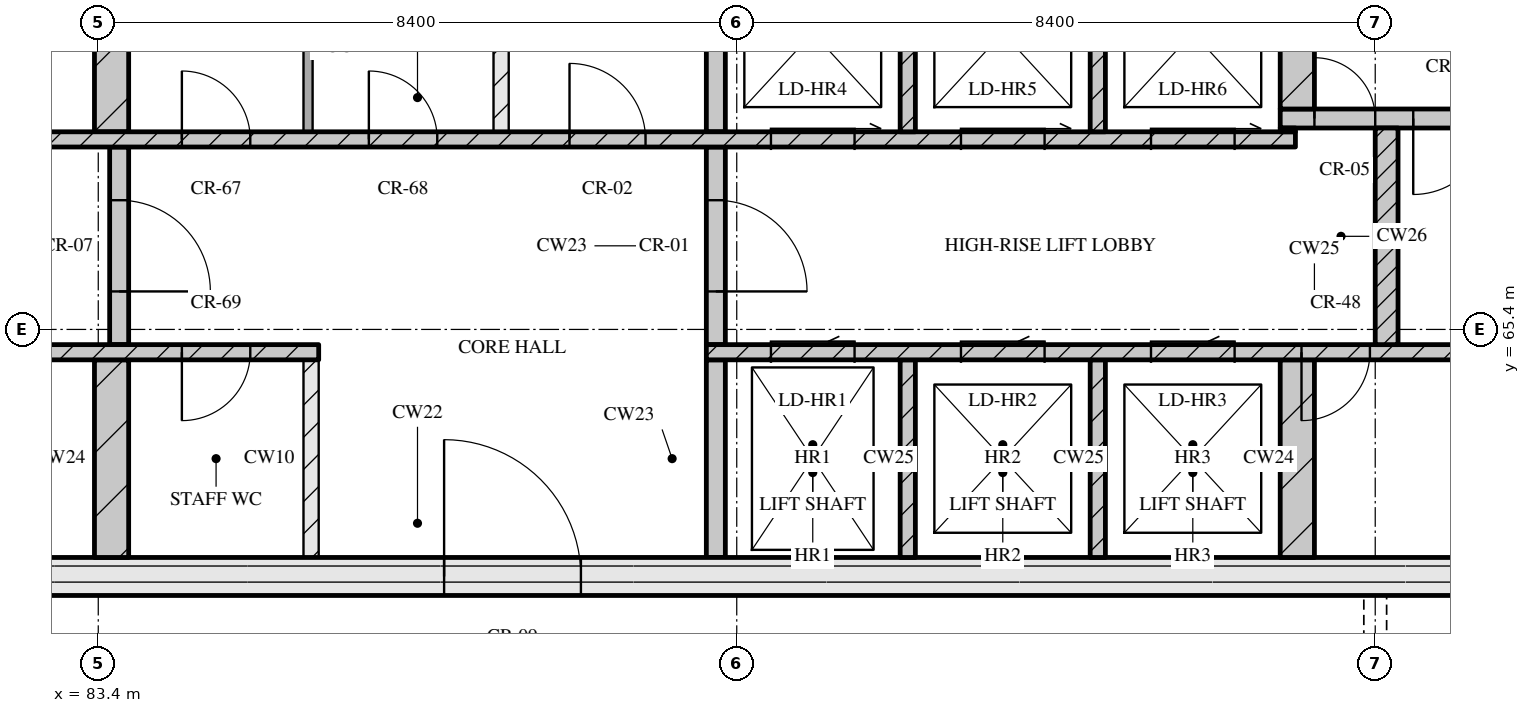
"""IFC4 building model, lengths in metres.
Left out: names, types, materials, properties, quantities, classifications, styles, units other than length and angle.
Written with IfcOpenShell. Run it as: python <this file> out.ifc"""

import sys

from ifc_helpers import new_model, si_unit, direction, frame, frame_2d, origin, place, context, subcontext, project, spatial, rectangle, extrude, element, fill, save


model = new_model("IFC4")
c1 = context("Model", 3, precision=1e-05, world=origin(), true_north=direction((0.0, 1.0)))
c2 = subcontext(c1, "Body", "Model", "MODEL_VIEW")
j1 = project(units=[si_unit("LENGTHUNIT", "METRE"), si_unit("PLANEANGLEUNIT", "RADIAN")], contexts=[c1])
p1 = place(None, origin())
s1 = spatial("IfcSite", under=j1, at=p1, CompositionType="ELEMENT")
p2 = place(p1, origin())
s2 = spatial("IfcBuilding", under=s1, at=p2, CompositionType="ELEMENT")
p3 = place(p2, frame((0.0, 0.0, 274.35)))
s3 = spatial("IfcBuildingStorey", under=s2, at=p3, CompositionType="ELEMENT", Elevation=274.35)
p4 = place(p3, frame((67.3, 62.15, 0.0), z_axis=(0.0, 0.0, 1.0), x_axis=(1.0, 0.0, 0.0)))
e1 = element("IfcWall", 1, at=p4, inside=s3, PredefinedType="SOLIDWALL", context=c2, shape_type="SweptSolid", body=[
    extrude(rectangle(XDim=40.6, YDim=0.5, at=frame_2d((20.3, 0.0))), origin(), (0.0, 0.0, 1.0), 3.32),
])
p5 = place(p4, frame((20.65, 0.0, 0.0)))
e2 = element("IfcOpeningElement", 2, at=p5, cuts=e1, PredefinedType="OPENING", context=c2, shape_type="SweptSolid", body=[
    extrude(rectangle(XDim=1.8, YDim=2.1, at=frame_2d((0.9, 1.05))), frame((0.0, 0.26, 0.0), z_axis=(0.0, -1.0, 0.0), x_axis=(1.0, 0.0, 0.0)), (0.0, 0.0, 1.0), 0.52),
])
p6 = place(p3, frame((83.575, 62.4, 0.0), z_axis=(0.0, 0.0, 1.0), x_axis=(0.0, 1.0, 0.0)))
e3 = element("IfcWall", 3, at=p6, inside=s3, PredefinedType="SOLIDWALL", context=c2, shape_type="SweptSolid", body=[
    extrude(rectangle(XDim=2.6, YDim=0.45, at=frame_2d((1.3, 0.0))), origin(), (0.0, 0.0, 1.0), 3.32),
])
p7 = place(p3, frame((86.2, 62.4, 0.0), z_axis=(0.0, 0.0, 1.0), x_axis=(0.0, 1.0, 0.0)))
e4 = element("IfcWall", 4, at=p7, inside=s3, PredefinedType="PARTITIONING", context=c2, shape_type="SweptSolid", body=[
    extrude(rectangle(XDim=2.6, YDim=0.2, at=frame_2d((1.3, 0.0))), origin(), (0.0, 0.0, 1.0), 3.32),
])
p8 = place(p3, frame((91.525, 62.4, 0.0), z_axis=(0.0, 0.0, 1.0), x_axis=(0.0, 1.0, 0.0)))
e5 = element("IfcWall", 5, at=p8, inside=s3, PredefinedType="SOLIDWALL", context=c2, shape_type="SweptSolid", body=[
    extrude(rectangle(XDim=2.6, YDim=0.25, at=frame_2d((1.3, 0.0))), origin(), (0.0, 0.0, 1.0), 3.32),
])
for number, where, z_axis, x_axis in (
    (6, (94.05, 62.4, 0.0), (0.0, 0.0, 1.0), (0.0, 1.0, 0.0)),
    (7, (96.55, 62.4, 0.0), (0.0, 0.0, 1.0), (0.0, 1.0, 0.0)),
):
    element("IfcWall", number, at=place(p3, frame(where, z_axis=z_axis, x_axis=x_axis)), inside=s3, PredefinedType="SOLIDWALL", context=c2, shape_type="SweptSolid", body=[
        extrude(rectangle(XDim=2.6, YDim=0.2, at=frame_2d((1.3, 0.0))), origin(), (0.0, 0.0, 1.0), 3.32),
    ])
p9 = place(p3, frame((99.175, 62.4, 0.0), z_axis=(0.0, 0.0, 1.0), x_axis=(0.0, 1.0, 0.0)))
e8 = element("IfcWall", 8, at=p9, inside=s3, PredefinedType="SOLIDWALL", context=c2, shape_type="SweptSolid", body=[
    extrude(rectangle(XDim=2.6, YDim=0.45, at=frame_2d((1.3, 0.0))), origin(), (0.0, 0.0, 1.0), 3.32),
])
p10 = place(p3, frame((67.8, 65.1, 0.0), z_axis=(0.0, 0.0, 1.0), x_axis=(1.0, 0.0, 0.0)))
e9 = element("IfcWall", 9, at=p10, inside=s3, PredefinedType="SOLIDWALL", context=c2, shape_type="SweptSolid", body=[
    extrude(rectangle(XDim=18.5, YDim=0.2, at=frame_2d((9.25, 0.0))), origin(), (0.0, 0.0, 1.0), 3.32),
])
p11 = place(p10, frame((7.27, 0.0, 0.0)))
e10 = element("IfcOpeningElement", 10, at=p11, cuts=e9, PredefinedType="OPENING", context=c2, shape_type="SweptSolid", body=[
    extrude(rectangle(XDim=0.9, YDim=2.1, at=frame_2d((0.45, 1.05))), frame((0.0, 0.11, 0.0), z_axis=(0.0, -1.0, 0.0), x_axis=(1.0, 0.0, 0.0)), (0.0, 0.0, 1.0), 0.22),
])
p12 = place(p10, frame((9.05, 0.0, 0.0)))
e11 = element("IfcOpeningElement", 11, at=p12, cuts=e9, PredefinedType="OPENING", context=c2, shape_type="SweptSolid", body=[
    extrude(rectangle(XDim=0.9, YDim=2.1, at=frame_2d((0.45, 1.05))), frame((0.0, 0.11, 0.0), z_axis=(0.0, -1.0, 0.0), x_axis=(1.0, 0.0, 0.0)), (0.0, 0.0, 1.0), 0.22),
])
p13 = place(p10, frame((12.76, 0.0, 0.0)))
e12 = element("IfcOpeningElement", 12, at=p13, cuts=e9, PredefinedType="OPENING", context=c2, shape_type="SweptSolid", body=[
    extrude(rectangle(XDim=0.9, YDim=2.1, at=frame_2d((0.45, 1.05))), frame((0.0, 0.11, 0.0), z_axis=(0.0, -1.0, 0.0), x_axis=(1.0, 0.0, 0.0)), (0.0, 0.0, 1.0), 0.22),
])
p14 = place(p10, frame((16.7, 0.0, 0.0)))
e13 = element("IfcOpeningElement", 13, at=p14, cuts=e9, PredefinedType="OPENING", context=c2, shape_type="SweptSolid", body=[
    extrude(rectangle(XDim=0.9, YDim=2.1, at=frame_2d((0.45, 1.05))), frame((0.0, 0.11, 0.0), z_axis=(0.0, -1.0, 0.0), x_axis=(1.0, 0.0, 0.0)), (0.0, 0.0, 1.0), 0.22),
])
p15 = place(p3, frame((91.4, 65.1, 0.0), z_axis=(0.0, 0.0, 1.0), x_axis=(1.0, 0.0, 0.0)))
e14 = element("IfcWall", 14, at=p15, inside=s3, PredefinedType="SOLIDWALL", context=c2, shape_type="SweptSolid", body=[
    extrude(rectangle(XDim=16.0, YDim=0.2, at=frame_2d((8.0, 0.0))), origin(), (0.0, 0.0, 1.0), 3.32),
])
p16 = place(p15, frame((0.85, 0.0, 0.0)))
e15 = element("IfcOpeningElement", 15, at=p16, cuts=e14, PredefinedType="OPENING", context=c2, shape_type="SweptSolid", body=[
    extrude(rectangle(XDim=1.1, YDim=2.1, at=frame_2d((0.55, 1.05))), frame((0.0, 0.11, 0.0), z_axis=(0.0, -1.0, 0.0), x_axis=(1.0, 0.0, 0.0)), (0.0, 0.0, 1.0), 0.22),
])
p17 = place(p15, frame((3.35, 0.0, 0.0)))
e16 = element("IfcOpeningElement", 16, at=p17, cuts=e14, PredefinedType="OPENING", context=c2, shape_type="SweptSolid", body=[
    extrude(rectangle(XDim=1.1, YDim=2.1, at=frame_2d((0.55, 1.05))), frame((0.0, 0.11, 0.0), z_axis=(0.0, -1.0, 0.0), x_axis=(1.0, 0.0, 0.0)), (0.0, 0.0, 1.0), 0.22),
])
p18 = place(p15, frame((5.85, 0.0, 0.0)))
e17 = element("IfcOpeningElement", 17, at=p18, cuts=e14, PredefinedType="OPENING", context=c2, shape_type="SweptSolid", body=[
    extrude(rectangle(XDim=1.1, YDim=2.1, at=frame_2d((0.55, 1.05))), frame((0.0, 0.11, 0.0), z_axis=(0.0, -1.0, 0.0), x_axis=(1.0, 0.0, 0.0)), (0.0, 0.0, 1.0), 0.22),
])
p19 = place(p15, frame((7.83, 0.0, 0.0)))
e18 = element("IfcOpeningElement", 18, at=p19, cuts=e14, PredefinedType="OPENING", context=c2, shape_type="SweptSolid", body=[
    extrude(rectangle(XDim=0.9, YDim=2.1, at=frame_2d((0.45, 1.05))), frame((0.0, 0.11, 0.0), z_axis=(0.0, -1.0, 0.0), x_axis=(1.0, 0.0, 0.0)), (0.0, 0.0, 1.0), 0.22),
])
p20 = place(p3, frame((83.675, 65.2, 0.0), z_axis=(0.0, 0.0, 1.0), x_axis=(0.0, 1.0, 0.0)))
e19 = element("IfcWall", 19, at=p20, inside=s3, PredefinedType="SOLIDWALL", context=c2, shape_type="SweptSolid", body=[
    extrude(rectangle(XDim=2.6, YDim=0.25, at=frame_2d((1.3, 0.0))), origin(), (0.0, 0.0, 1.0), 3.32),
])
p21 = place(p20, frame((0.7, 0.0, 0.0)))
e20 = element("IfcOpeningElement", 20, at=p21, cuts=e19, PredefinedType="OPENING", context=c2, shape_type="SweptSolid", body=[
    extrude(rectangle(XDim=1.2, YDim=2.1, at=frame_2d((0.6, 1.05))), frame((0.0, 0.135, 0.0), z_axis=(0.0, -1.0, 0.0), x_axis=(1.0, 0.0, 0.0)), (0.0, 0.0, 1.0), 0.27),
])
p22 = place(p3, frame((91.525, 65.2, 0.0), z_axis=(0.0, 0.0, 1.0), x_axis=(0.0, 1.0, 0.0)))
e21 = element("IfcWall", 21, at=p22, inside=s3, PredefinedType="SOLIDWALL", context=c2, shape_type="SweptSolid", body=[
    extrude(rectangle(XDim=2.6, YDim=0.25, at=frame_2d((1.3, 0.0))), origin(), (0.0, 0.0, 1.0), 3.32),
])
p23 = place(p22, frame((0.7, 0.0, 0.0)))
e22 = element("IfcOpeningElement", 22, at=p23, cuts=e21, PredefinedType="OPENING", context=c2, shape_type="SweptSolid", body=[
    extrude(rectangle(XDim=1.2, YDim=2.1, at=frame_2d((0.6, 1.05))), frame((0.0, 0.135, 0.0), z_axis=(0.0, -1.0, 0.0), x_axis=(1.0, 0.0, 0.0)), (0.0, 0.0, 1.0), 0.27),
])
p24 = place(p3, frame((100.35, 65.2, 0.0), z_axis=(0.0, 0.0, 1.0), x_axis=(0.0, 1.0, 0.0)))
e23 = element("IfcWall", 23, at=p24, inside=s3, PredefinedType="SOLIDWALL", context=c2, shape_type="SweptSolid", body=[
    extrude(rectangle(XDim=2.85, YDim=0.3, at=frame_2d((1.425, 0.0))), origin(), (0.0, 0.0, 1.0), 3.32),
])
p25 = place(p3, frame((76.05, 67.9, 0.0), z_axis=(0.0, 0.0, 1.0), x_axis=(1.0, 0.0, 0.0)))
e24 = element("IfcWall", 24, at=p25, inside=s3, PredefinedType="SOLIDWALL", context=c2, shape_type="SweptSolid", body=[
    extrude(rectangle(XDim=23.1, YDim=0.2, at=frame_2d((11.55, 0.0))), origin(), (0.0, 0.0, 1.0), 3.32),
])
p26 = place(p25, frame((1.35, 0.0, 0.0)))
e25 = element("IfcOpeningElement", 25, at=p26, cuts=e24, PredefinedType="OPENING", context=c2, shape_type="SweptSolid", body=[
    extrude(rectangle(XDim=0.9, YDim=2.1, at=frame_2d((0.45, 1.05))), frame((0.0, 0.11, 0.0), z_axis=(0.0, -1.0, 0.0), x_axis=(1.0, 0.0, 0.0)), (0.0, 0.0, 1.0), 0.22),
])
p27 = place(p25, frame((5.06, 0.0, 0.0)))
e26 = element("IfcOpeningElement", 26, at=p27, cuts=e24, PredefinedType="OPENING", context=c2, shape_type="SweptSolid", body=[
    extrude(rectangle(XDim=0.9, YDim=2.1, at=frame_2d((0.45, 1.05))), frame((0.0, 0.11, 0.0), z_axis=(0.0, -1.0, 0.0), x_axis=(1.0, 0.0, 0.0)), (0.0, 0.0, 1.0), 0.22),
])
p28 = place(p25, frame((8.45, 0.0, 0.0)))
e27 = element("IfcOpeningElement", 27, at=p28, cuts=e24, PredefinedType="OPENING", context=c2, shape_type="SweptSolid", body=[
    extrude(rectangle(XDim=0.9, YDim=2.1, at=frame_2d((0.45, 1.05))), frame((0.0, 0.11, 0.0), z_axis=(0.0, -1.0, 0.0), x_axis=(1.0, 0.0, 0.0)), (0.0, 0.0, 1.0), 0.22),
])
p29 = place(p25, frame((10.91, 0.0, 0.0)))
e28 = element("IfcOpeningElement", 28, at=p29, cuts=e24, PredefinedType="OPENING", context=c2, shape_type="SweptSolid", body=[
    extrude(rectangle(XDim=0.9, YDim=2.1, at=frame_2d((0.45, 1.05))), frame((0.0, 0.11, 0.0), z_axis=(0.0, -1.0, 0.0), x_axis=(1.0, 0.0, 0.0)), (0.0, 0.0, 1.0), 0.22),
])
p30 = place(p25, frame((13.55, 0.0, 0.0)))
e29 = element("IfcOpeningElement", 29, at=p30, cuts=e24, PredefinedType="OPENING", context=c2, shape_type="SweptSolid", body=[
    extrude(rectangle(XDim=1.0, YDim=2.1, at=frame_2d((0.5, 1.05))), frame((0.0, 0.11, 0.0), z_axis=(0.0, -1.0, 0.0), x_axis=(1.0, 0.0, 0.0)), (0.0, 0.0, 1.0), 0.22),
])
p31 = place(p25, frame((16.2, 0.0, 0.0)))
e30 = element("IfcOpeningElement", 30, at=p31, cuts=e24, PredefinedType="OPENING", context=c2, shape_type="SweptSolid", body=[
    extrude(rectangle(XDim=1.1, YDim=2.1, at=frame_2d((0.55, 1.05))), frame((0.0, 0.11, 0.0), z_axis=(0.0, -1.0, 0.0), x_axis=(1.0, 0.0, 0.0)), (0.0, 0.0, 1.0), 0.22),
])
p32 = place(p25, frame((18.7, 0.0, 0.0)))
e31 = element("IfcOpeningElement", 31, at=p32, cuts=e24, PredefinedType="OPENING", context=c2, shape_type="SweptSolid", body=[
    extrude(rectangle(XDim=1.1, YDim=2.1, at=frame_2d((0.55, 1.05))), frame((0.0, 0.11, 0.0), z_axis=(0.0, -1.0, 0.0), x_axis=(1.0, 0.0, 0.0)), (0.0, 0.0, 1.0), 0.22),
])
p33 = place(p25, frame((21.2, 0.0, 0.0)))
e32 = element("IfcOpeningElement", 32, at=p33, cuts=e24, PredefinedType="OPENING", context=c2, shape_type="SweptSolid", body=[
    extrude(rectangle(XDim=1.1, YDim=2.1, at=frame_2d((0.55, 1.05))), frame((0.0, 0.11, 0.0), z_axis=(0.0, -1.0, 0.0), x_axis=(1.0, 0.0, 0.0)), (0.0, 0.0, 1.0), 0.22),
])
p34 = place(p3, frame((83.575, 68.0, 0.0), z_axis=(0.0, 0.0, 1.0), x_axis=(0.0, 1.0, 0.0)))
e33 = element("IfcWall", 33, at=p34, inside=s3, PredefinedType="SOLIDWALL", context=c2, shape_type="SweptSolid", body=[
    extrude(rectangle(XDim=2.6, YDim=0.45, at=frame_2d((1.3, 0.0))), origin(), (0.0, 0.0, 1.0), 3.32),
])
p35 = place(p3, frame((86.16, 68.0, 0.0), z_axis=(0.0, 0.0, 1.0), x_axis=(0.0, 1.0, 0.0)))
e34 = element("IfcWall", 34, at=p35, inside=s3, PredefinedType="PARTITIONING", context=c2, shape_type="SweptSolid", body=[
    extrude(rectangle(XDim=2.6, YDim=0.12, at=frame_2d((1.3, 0.0))), origin(), (0.0, 0.0, 1.0), 3.32),
])
p36 = place(p3, frame((88.7, 68.0, 0.0), z_axis=(0.0, 0.0, 1.0), x_axis=(0.0, 1.0, 0.0)))
e35 = element("IfcWall", 35, at=p36, inside=s3, PredefinedType="PARTITIONING", context=c2, shape_type="SweptSolid", body=[
    extrude(rectangle(XDim=2.6, YDim=0.2, at=frame_2d((1.3, 0.0))), origin(), (0.0, 0.0, 1.0), 3.32),
])
p37 = place(p3, frame((91.525, 68.0, 0.0), z_axis=(0.0, 0.0, 1.0), x_axis=(0.0, 1.0, 0.0)))
e36 = element("IfcWall", 36, at=p37, inside=s3, PredefinedType="SOLIDWALL", context=c2, shape_type="SweptSolid", body=[
    extrude(rectangle(XDim=2.6, YDim=0.25, at=frame_2d((1.3, 0.0))), origin(), (0.0, 0.0, 1.0), 3.32),
])
for number, where, z_axis, x_axis in (
    (37, (94.05, 68.0, 0.0), (0.0, 0.0, 1.0), (0.0, 1.0, 0.0)),
    (38, (96.55, 68.0, 0.0), (0.0, 0.0, 1.0), (0.0, 1.0, 0.0)),
):
    element("IfcWall", number, at=place(p3, frame(where, z_axis=z_axis, x_axis=x_axis)), inside=s3, PredefinedType="SOLIDWALL", context=c2, shape_type="SweptSolid", body=[
        extrude(rectangle(XDim=2.6, YDim=0.2, at=frame_2d((1.3, 0.0))), origin(), (0.0, 0.0, 1.0), 3.32),
    ])
p38 = place(p3, frame((98.95, 68.025, 0.0), z_axis=(0.0, 0.0, 1.0), x_axis=(1.0, 0.0, 0.0)))
e39 = element("IfcWall", 39, at=p38, inside=s3, PredefinedType="SOLIDWALL", context=c2, shape_type="SweptSolid", body=[
    extrude(rectangle(XDim=0.2, YDim=0.05, at=frame_2d((0.1, 0.0))), origin(), (0.0, 0.0, 1.0), 3.32),
])
p39 = place(p3, frame((98.95, 68.175, 0.0), z_axis=(0.0, 0.0, 1.0), x_axis=(1.0, 0.0, 0.0)))
e40 = element("IfcWall", 40, at=p39, inside=s3, PredefinedType="SOLIDWALL", context=c2, shape_type="SweptSolid", body=[
    extrude(rectangle(XDim=8.45, YDim=0.25, at=frame_2d((4.225, 0.0))), origin(), (0.0, 0.0, 1.0), 3.32),
])
p40 = place(p39, frame((0.45, 0.0, 0.0)))
e41 = element("IfcOpeningElement", 41, at=p40, cuts=e40, PredefinedType="OPENING", context=c2, shape_type="SweptSolid", body=[
    extrude(rectangle(XDim=0.8, YDim=2.1, at=frame_2d((0.4, 1.05))), frame((0.0, 0.135, 0.0), z_axis=(0.0, -1.0, 0.0), x_axis=(1.0, 0.0, 0.0)), (0.0, 0.0, 1.0), 0.27),
])
p41 = place(p39, frame((1.75, 0.0, 0.0)))
e42 = element("IfcOpeningElement", 42, at=p41, cuts=e40, PredefinedType="OPENING", context=c2, shape_type="SweptSolid", body=[
    extrude(rectangle(XDim=1.0, YDim=2.1, at=frame_2d((0.5, 1.05))), frame((0.0, 0.135, 0.0), z_axis=(0.0, -1.0, 0.0), x_axis=(1.0, 0.0, 0.0)), (0.0, 0.0, 1.0), 0.27),
])
p42 = place(p3, frame((99.175, 68.3, 0.0), z_axis=(0.0, 0.0, 1.0), x_axis=(0.0, 1.0, 0.0)))
e43 = element("IfcWall", 43, at=p42, inside=s3, PredefinedType="SOLIDWALL", context=c2, shape_type="SweptSolid", body=[
    extrude(rectangle(XDim=2.3, YDim=0.45, at=frame_2d((1.15, 0.0))), origin(), (0.0, 0.0, 1.0), 3.32),
])
p43 = place(p5, origin())
e44 = element("IfcDoor", 44, at=p43, inside=s3, OperationType="DOUBLE_DOOR_SINGLE_SWING", PredefinedType="DOOR", context=c2, shape_type="SweptSolid", body=[
    extrude(rectangle(XDim=1.8, YDim=2.1, at=frame_2d((0.9, 1.05))), frame((0.0, 0.025, 0.0), z_axis=(0.0, -1.0, 0.0), x_axis=(1.0, 0.0, 0.0)), (0.0, 0.0, 1.0), 0.05),
])
fill(e2, e44)
p44 = place(p14, origin())
e45 = element("IfcDoor", 45, at=p44, inside=s3, OperationType="SINGLE_SWING_RIGHT", PredefinedType="DOOR", context=c2, shape_type="SweptSolid", body=[
    extrude(rectangle(XDim=0.9, YDim=2.1, at=frame_2d((0.45, 1.05))), frame((0.0, 0.025, 0.0), z_axis=(0.0, -1.0, 0.0), x_axis=(1.0, 0.0, 0.0)), (0.0, 0.0, 1.0), 0.05),
])
fill(e13, e45)
p45 = place(p16, origin())
e46 = element("IfcDoor", 46, at=p45, inside=s3, OperationType="SLIDING_TO_LEFT", PredefinedType="DOOR", context=c2, shape_type="SweptSolid", body=[
    extrude(rectangle(XDim=1.1, YDim=2.1, at=frame_2d((0.55, 1.05))), frame((0.0, 0.025, 0.0), z_axis=(0.0, -1.0, 0.0), x_axis=(1.0, 0.0, 0.0)), (0.0, 0.0, 1.0), 0.05),
])
fill(e15, e46)
p46 = place(p17, origin())
e47 = element("IfcDoor", 47, at=p46, inside=s3, OperationType="SLIDING_TO_LEFT", PredefinedType="DOOR", context=c2, shape_type="SweptSolid", body=[
    extrude(rectangle(XDim=1.1, YDim=2.1, at=frame_2d((0.55, 1.05))), frame((0.0, 0.025, 0.0), z_axis=(0.0, -1.0, 0.0), x_axis=(1.0, 0.0, 0.0)), (0.0, 0.0, 1.0), 0.05),
])
fill(e16, e47)
p47 = place(p18, origin())
e48 = element("IfcDoor", 48, at=p47, inside=s3, OperationType="SLIDING_TO_LEFT", PredefinedType="DOOR", context=c2, shape_type="SweptSolid", body=[
    extrude(rectangle(XDim=1.1, YDim=2.1, at=frame_2d((0.55, 1.05))), frame((0.0, 0.025, 0.0), z_axis=(0.0, -1.0, 0.0), x_axis=(1.0, 0.0, 0.0)), (0.0, 0.0, 1.0), 0.05),
])
fill(e17, e48)
p48 = place(p19, origin())
e49 = element("IfcDoor", 49, at=p48, inside=s3, OperationType="SINGLE_SWING_RIGHT", PredefinedType="DOOR", context=c2, shape_type="SweptSolid", body=[
    extrude(rectangle(XDim=0.9, YDim=2.1, at=frame_2d((0.45, 1.05))), frame((0.0, 0.025, 0.0), z_axis=(0.0, -1.0, 0.0), x_axis=(1.0, 0.0, 0.0)), (0.0, 0.0, 1.0), 0.05),
])
fill(e18, e49)
p49 = place(p21, origin())
e50 = element("IfcDoor", 50, at=p49, inside=s3, OperationType="SINGLE_SWING_RIGHT", PredefinedType="DOOR", context=c2, shape_type="SweptSolid", body=[
    extrude(rectangle(XDim=1.2, YDim=2.1, at=frame_2d((0.6, 1.05))), frame((0.0, 0.025, 0.0), z_axis=(0.0, -1.0, 0.0), x_axis=(1.0, 0.0, 0.0)), (0.0, 0.0, 1.0), 0.05),
])
fill(e20, e50)
p50 = place(p23, origin())
e51 = element("IfcDoor", 51, at=p50, inside=s3, OperationType="SINGLE_SWING_RIGHT", PredefinedType="DOOR", context=c2, shape_type="SweptSolid", body=[
    extrude(rectangle(XDim=1.2, YDim=2.1, at=frame_2d((0.6, 1.05))), frame((0.0, 0.025, 0.0), z_axis=(0.0, -1.0, 0.0), x_axis=(1.0, 0.0, 0.0)), (0.0, 0.0, 1.0), 0.05),
])
fill(e22, e51)
p51 = place(p28, origin())
e52 = element("IfcDoor", 52, at=p51, inside=s3, OperationType="SINGLE_SWING_LEFT", PredefinedType="DOOR", context=c2, shape_type="SweptSolid", body=[
    extrude(rectangle(XDim=0.9, YDim=2.1, at=frame_2d((0.45, 1.05))), frame((0.0, 0.025, 0.0), z_axis=(0.0, -1.0, 0.0), x_axis=(1.0, 0.0, 0.0)), (0.0, 0.0, 1.0), 0.05),
])
fill(e27, e52)
p52 = place(p29, origin())
e53 = element("IfcDoor", 53, at=p52, inside=s3, OperationType="SINGLE_SWING_LEFT", PredefinedType="DOOR", context=c2, shape_type="SweptSolid", body=[
    extrude(rectangle(XDim=0.9, YDim=2.1, at=frame_2d((0.45, 1.05))), frame((0.0, 0.025, 0.0), z_axis=(0.0, -1.0, 0.0), x_axis=(1.0, 0.0, 0.0)), (0.0, 0.0, 1.0), 0.05),
])
fill(e28, e53)
p53 = place(p30, origin())
e54 = element("IfcDoor", 54, at=p53, inside=s3, OperationType="SINGLE_SWING_LEFT", PredefinedType="DOOR", context=c2, shape_type="SweptSolid", body=[
    extrude(rectangle(XDim=1.0, YDim=2.1, at=frame_2d((0.5, 1.05))), frame((0.0, 0.025, 0.0), z_axis=(0.0, -1.0, 0.0), x_axis=(1.0, 0.0, 0.0)), (0.0, 0.0, 1.0), 0.05),
])
fill(e29, e54)
p54 = place(p31, origin())
e55 = element("IfcDoor", 55, at=p54, inside=s3, OperationType="SLIDING_TO_RIGHT", PredefinedType="DOOR", context=c2, shape_type="SweptSolid", body=[
    extrude(rectangle(XDim=1.1, YDim=2.1, at=frame_2d((0.55, 1.05))), frame((0.0, 0.025, 0.0), z_axis=(0.0, -1.0, 0.0), x_axis=(1.0, 0.0, 0.0)), (0.0, 0.0, 1.0), 0.05),
])
fill(e30, e55)
p55 = place(p32, origin())
e56 = element("IfcDoor", 56, at=p55, inside=s3, OperationType="SLIDING_TO_RIGHT", PredefinedType="DOOR", context=c2, shape_type="SweptSolid", body=[
    extrude(rectangle(XDim=1.1, YDim=2.1, at=frame_2d((0.55, 1.05))), frame((0.0, 0.025, 0.0), z_axis=(0.0, -1.0, 0.0), x_axis=(1.0, 0.0, 0.0)), (0.0, 0.0, 1.0), 0.05),
])
fill(e31, e56)
p56 = place(p33, origin())
e57 = element("IfcDoor", 57, at=p56, inside=s3, OperationType="SLIDING_TO_RIGHT", PredefinedType="DOOR", context=c2, shape_type="SweptSolid", body=[
    extrude(rectangle(XDim=1.1, YDim=2.1, at=frame_2d((0.55, 1.05))), frame((0.0, 0.025, 0.0), z_axis=(0.0, -1.0, 0.0), x_axis=(1.0, 0.0, 0.0)), (0.0, 0.0, 1.0), 0.05),
])
fill(e32, e57)
p57 = place(p40, origin())
e58 = element("IfcDoor", 58, at=p57, inside=s3, OperationType="SINGLE_SWING_LEFT", PredefinedType="DOOR", context=c2, shape_type="SweptSolid", body=[
    extrude(rectangle(XDim=0.8, YDim=2.1, at=frame_2d((0.4, 1.05))), frame((0.0, 0.025, 0.0), z_axis=(0.0, -1.0, 0.0), x_axis=(1.0, 0.0, 0.0)), (0.0, 0.0, 1.0), 0.05),
])
fill(e41, e58)
p58 = place(p41, origin())
e59 = element("IfcDoor", 59, at=p58, inside=s3, OperationType="SINGLE_SWING_RIGHT", PredefinedType="DOOR", context=c2, shape_type="SweptSolid", body=[
    extrude(rectangle(XDim=1.0, YDim=2.1, at=frame_2d((0.5, 1.05))), frame((0.0, 0.025, 0.0), z_axis=(0.0, -1.0, 0.0), x_axis=(1.0, 0.0, 0.0)), (0.0, 0.0, 1.0), 0.05),
])
fill(e42, e59)
save(model, sys.argv[1])
